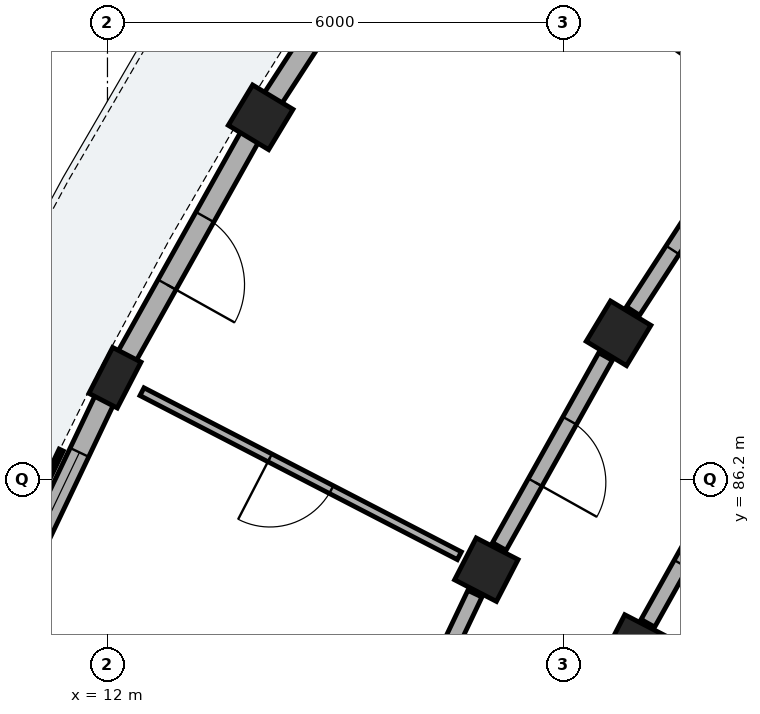
"""IFC4 building model, lengths in metres.
Left out: names, types, materials, properties, quantities, classifications, styles, units other than length and angle.
Written with IfcOpenShell. Run it as: python <this file> out.ifc"""

import sys

from ifc_helpers import new_model, si_unit, direction, frame, frame_2d, origin, origin_2d, place, context, subcontext, project, spatial, rectangle, extrude, element, fill, save


model = new_model("IFC4")
c1 = context("Model", 3, precision=1e-05, world=origin(), true_north=direction((0.0, 1.0)))
c2 = subcontext(c1, "Body", "Model", "MODEL_VIEW")
j1 = project(units=[si_unit("LENGTHUNIT", "METRE"), si_unit("PLANEANGLEUNIT", "RADIAN")], contexts=[c1])
p1 = place(None, origin())
s1 = spatial("IfcSite", under=j1, at=p1, CompositionType="ELEMENT")
p2 = place(p1, origin())
s2 = spatial("IfcBuilding", under=s1, at=p2, CompositionType="ELEMENT")
p3 = place(p2, frame((0.0, 0.0, 4.76)))
s3 = spatial("IfcBuildingStorey", under=s2, at=p3, CompositionType="ELEMENT", Elevation=4.76)
for number, where, z_axis, x_axis in (
    (1, (18.724, 88.128, 0.0), (0.0, 0.0, 1.0), (-0.856, 0.517, 0.0)),
    (2, (14.015, 90.969, 0.0), (0.0, 0.0, 1.0), (-0.856, 0.517, 0.0)),
    (3, (18.939, 84.008, 0.0), (0.0, 0.0, 1.0), (-0.888, 0.459, 0.0)),
    (4, (16.985, 85.018, 0.0), (0.0, 0.0, 1.0), (-0.888, 0.459, 0.0)),
):
    element("IfcColumn", number, at=place(p3, frame(where, z_axis=z_axis, x_axis=x_axis)), inside=s3, PredefinedType="COLUMN", context=c2, shape_type="SweptSolid", body=[
        extrude(rectangle(XDim=0.62, YDim=0.62, at=origin_2d()), origin(), (0.0, 0.0, 1.0), 3.825),
    ])
p4 = place(p3, frame((12.099, 87.543, 0.0), z_axis=(0.0, 0.0, 1.0), x_axis=(-0.888350277506, 0.459166401705, 0.0)))
e5 = element("IfcColumn", 5, at=p4, inside=s3, PredefinedType="PILASTER", context=c2, shape_type="SweptSolid", body=[
    extrude(rectangle(XDim=0.42, YDim=0.68, at=origin_2d()), origin(), (0.0, 0.0, 1.0), 3.825),
])
p5 = place(p3, frame((16.055, 94.111, 0.0), z_axis=(0.0, 0.0, 1.0), x_axis=(-0.544678802261, -0.838644741453, 0.0)))
e6 = element("IfcWall", 6, at=p5, inside=s3, PredefinedType="SOLIDWALL", context=c2, shape_type="SweptSolid", body=[
    extrude(rectangle(XDim=3.466, YDim=0.27, at=frame_2d((1.733, 0.0))), origin(), (0.0, 0.0, 1.0), 3.075),
])
p6 = place(p5, frame((1.058, 0.0, 0.55)))
e7 = element("IfcOpeningElement", 7, at=p6, cuts=e6, PredefinedType="OPENING", context=c2, shape_type="SweptSolid", body=[
    extrude(rectangle(XDim=1.35, YDim=1.65, at=frame_2d((0.675, 0.825))), frame((0.0, 0.145, 0.0), z_axis=(0.0, -1.0, 0.0), x_axis=(1.0, 0.0, 0.0)), (0.0, 0.0, 1.0), 0.29),
])
p7 = place(p3, frame((13.879, 90.725, 0.0), z_axis=(0.0, 0.0, 1.0), x_axis=(-0.488236527441, -0.872711345905, 0.0)))
e8 = element("IfcWall", 8, at=p7, inside=s3, PredefinedType="SOLIDWALL", context=c2, shape_type="SweptSolid", body=[
    extrude(rectangle(XDim=3.466, YDim=0.27, at=frame_2d((1.733, 0.0))), origin(), (0.0, 0.0, 1.0), 3.075),
])
p8 = place(p7, frame((1.223, 0.0, 0.0)))
e9 = element("IfcOpeningElement", 9, at=p8, cuts=e8, PredefinedType="OPENING", context=c2, shape_type="SweptSolid", body=[
    extrude(rectangle(XDim=1.02, YDim=2.14, at=frame_2d((0.51, 1.07))), frame((0.0, 0.145, 0.0), z_axis=(0.0, -1.0, 0.0), x_axis=(1.0, 0.0, 0.0)), (0.0, 0.0, 1.0), 0.29),
])
p9 = place(p3, frame((12.021, 87.381, 0.0), z_axis=(0.0, 0.0, 1.0), x_axis=(-0.4296300405, -0.903004999045, 0.0)))
e10 = element("IfcWall", 10, at=p9, inside=s3, PredefinedType="SOLIDWALL", context=c2, shape_type="SweptSolid", body=[
    extrude(rectangle(XDim=3.466, YDim=0.27, at=frame_2d((1.733, 0.0))), origin(), (0.0, 0.0, 1.0), 3.075),
])
p10 = place(p9, frame((0.908, 0.0, 0.55)))
e11 = element("IfcOpeningElement", 11, at=p10, cuts=e10, PredefinedType="OPENING", context=c2, shape_type="SweptSolid", body=[
    extrude(rectangle(XDim=1.65, YDim=1.8, at=frame_2d((0.825, 0.9))), frame((0.0, 0.145, 0.0), z_axis=(0.0, -1.0, 0.0), x_axis=(1.0, 0.0, 0.0)), (0.0, 0.0, 1.0), 0.29),
])
p11 = place(p3, frame((20.337, 91.345, 0.0), z_axis=(0.0, 0.0, 1.0), x_axis=(-0.820272617205, 0.571972755876, 0.0)))
e12 = element("IfcWall", 12, at=p11, inside=s3, PredefinedType="PLUMBINGWALL", context=c2, shape_type="SweptSolid", body=[
    extrude(rectangle(XDim=4.7, YDim=0.14, at=frame_2d((2.35, 0.0))), origin(), (0.0, 0.0, 1.0), 3.09),
])
p12 = place(p11, frame((1.92, 0.0, 0.0)))
e13 = element("IfcOpeningElement", 13, at=p12, cuts=e12, PredefinedType="OPENING", context=c2, shape_type="SweptSolid", body=[
    extrude(rectangle(XDim=0.86, YDim=2.06, at=frame_2d((0.43, 1.03))), frame((0.0, 0.08, 0.0), z_axis=(0.0, -1.0, 0.0), x_axis=(1.0, 0.0, 0.0)), (0.0, 0.0, 1.0), 0.16),
])
p13 = place(p3, frame((20.474, 90.822, 0.0), z_axis=(0.0, 0.0, 1.0), x_axis=(-0.544643612649, -0.838667595178, 0.0)))
e14 = element("IfcWall", 14, at=p13, inside=s3, PredefinedType="PARTITIONING", context=c2, shape_type="SweptSolid", body=[
    extrude(rectangle(XDim=2.863, YDim=0.205, at=frame_2d((1.432, 0.0))), origin(), (0.0, 0.0, 1.0), 3.09),
])
p14 = place(p13, frame((0.957, 0.0, 0.0)))
e15 = element("IfcOpeningElement", 15, at=p14, cuts=e14, PredefinedType="OPENING", context=c2, shape_type="SweptSolid", body=[
    extrude(rectangle(XDim=0.95, YDim=2.13, at=frame_2d((0.475, 1.065))), frame((0.0, 0.113, 0.0), z_axis=(0.0, -1.0, 0.0), x_axis=(1.0, 0.0, 0.0)), (0.0, 0.0, 1.0), 0.225),
])
p15 = place(p3, frame((18.553, 87.822, 0.0), z_axis=(0.0, 0.0, 1.0), x_axis=(-0.488211211273, -0.872725508501, 0.0)))
e16 = element("IfcWall", 16, at=p15, inside=s3, PredefinedType="PARTITIONING", context=c2, shape_type="SweptSolid", body=[
    extrude(rectangle(XDim=2.863, YDim=0.205, at=frame_2d((1.431, 0.0))), origin(), (0.0, 0.0, 1.0), 3.09),
])
p16 = place(p15, frame((0.967, 0.0, 0.0)))
e17 = element("IfcOpeningElement", 17, at=p16, cuts=e16, PredefinedType="OPENING", context=c2, shape_type="SweptSolid", body=[
    extrude(rectangle(XDim=0.93, YDim=2.12, at=frame_2d((0.465, 1.06))), frame((0.0, 0.113, 0.0), z_axis=(0.0, -1.0, 0.0), x_axis=(1.0, 0.0, 0.0)), (0.0, 0.0, 1.0), 0.225),
])
p17 = place(p3, frame((20.437, 86.685, 0.0), z_axis=(0.0, 0.0, 1.0), x_axis=(-0.48819576874, -0.872734147025, 0.0)))
e18 = element("IfcWall", 18, at=p17, inside=s3, PredefinedType="PARTITIONING", context=c2, shape_type="SweptSolid", body=[
    extrude(rectangle(XDim=2.718, YDim=0.205, at=frame_2d((1.359, 0.0))), origin(), (0.0, 0.0, 1.0), 3.09),
])
p18 = place(p17, frame((0.894, 0.0, 0.0)))
e19 = element("IfcOpeningElement", 19, at=p18, cuts=e18, PredefinedType="OPENING", context=c2, shape_type="SweptSolid", body=[
    extrude(rectangle(XDim=0.93, YDim=2.12, at=frame_2d((0.465, 1.06))), frame((0.0, 0.113, 0.0), z_axis=(0.0, -1.0, 0.0), x_axis=(1.0, 0.0, 0.0)), (0.0, 0.0, 1.0), 0.225),
])
p19 = place(p3, frame((16.629, 85.202, 0.0), z_axis=(0.0, 0.0, 1.0), x_axis=(-0.88836305433, 0.459141681512, 0.0)))
e20 = element("IfcWall", 20, at=p19, inside=s3, PredefinedType="PARTITIONING", context=c2, shape_type="SweptSolid", body=[
    extrude(rectangle(XDim=4.7, YDim=0.115, at=frame_2d((2.35, 0.0))), origin(), (0.0, 0.0, 1.0), 3.09),
])
p20 = place(p19, frame((1.895, 0.0, 0.0)))
e21 = element("IfcOpeningElement", 21, at=p20, cuts=e20, PredefinedType="OPENING", context=c2, shape_type="SweptSolid", body=[
    extrude(rectangle(XDim=0.91, YDim=2.1, at=frame_2d((0.455, 1.05))), frame((0.0, 0.067, 0.0), z_axis=(0.0, -1.0, 0.0), x_axis=(1.0, 0.0, 0.0)), (0.0, 0.0, 1.0), 0.135),
])
p21 = place(p3, frame((16.834, 84.702, 0.0), z_axis=(0.0, 0.0, 1.0), x_axis=(-0.429595933416, -0.90302122566, 0.0)))
e22 = element("IfcWall", 22, at=p21, inside=s3, PredefinedType="PARTITIONING", context=c2, shape_type="SweptSolid", body=[
    extrude(rectangle(XDim=2.863, YDim=0.205, at=frame_2d((1.432, 0.0))), origin(), (0.0, 0.0, 1.0), 3.09),
])
p22 = place(p21, frame((0.937, 0.0, 0.0)))
e23 = element("IfcOpeningElement", 23, at=p22, cuts=e22, PredefinedType="OPENING", context=c2, shape_type="SweptSolid", body=[
    extrude(rectangle(XDim=0.99, YDim=2.16, at=frame_2d((0.495, 1.08))), frame((0.0, 0.113, 0.0), z_axis=(0.0, -1.0, 0.0), x_axis=(1.0, 0.0, 0.0)), (0.0, 0.0, 1.0), 0.225),
])
p23 = place(p8, origin())
e24 = element("IfcDoor", 24, at=p23, inside=s3, OperationType="SINGLE_SWING_RIGHT", PredefinedType="DOOR", context=c2, shape_type="SweptSolid", body=[
    extrude(rectangle(XDim=1.02, YDim=2.14, at=frame_2d((0.51, 1.07))), frame((0.0, 0.025, 0.0), z_axis=(0.0, -1.0, 0.0), x_axis=(1.0, 0.0, 0.0)), (0.0, 0.0, 1.0), 0.05),
])
fill(e9, e24)
p24 = place(p10, origin())
e25 = element("IfcWindow", 25, at=p24, inside=s3, PartitioningType="SINGLE_PANEL", PredefinedType="WINDOW", context=c2, shape_type="SweptSolid", body=[
    extrude(rectangle(XDim=1.65, YDim=1.8, at=frame_2d((0.825, 0.9))), frame((0.0, 0.03, 0.0), z_axis=(0.0, -1.0, 0.0), x_axis=(1.0, 0.0, 0.0)), (0.0, 0.0, 1.0), 0.06),
])
fill(e11, e25)
p25 = place(p14, origin())
e26 = element("IfcDoor", 26, at=p25, inside=s3, OperationType="SINGLE_SWING_LEFT", PredefinedType="DOOR", context=c2, shape_type="SweptSolid", body=[
    extrude(rectangle(XDim=0.95, YDim=2.13, at=frame_2d((0.475, 1.065))), frame((0.0, 0.025, 0.0), z_axis=(0.0, -1.0, 0.0), x_axis=(1.0, 0.0, 0.0)), (0.0, 0.0, 1.0), 0.05),
])
fill(e15, e26)
p26 = place(p16, origin())
e27 = element("IfcDoor", 27, at=p26, inside=s3, OperationType="SINGLE_SWING_RIGHT", PredefinedType="DOOR", context=c2, shape_type="SweptSolid", body=[
    extrude(rectangle(XDim=0.93, YDim=2.12, at=frame_2d((0.465, 1.06))), frame((0.0, 0.025, 0.0), z_axis=(0.0, -1.0, 0.0), x_axis=(1.0, 0.0, 0.0)), (0.0, 0.0, 1.0), 0.05),
])
fill(e17, e27)
p27 = place(p18, origin())
e28 = element("IfcDoor", 28, at=p27, inside=s3, OperationType="SINGLE_SWING_LEFT", PredefinedType="DOOR", context=c2, shape_type="SweptSolid", body=[
    extrude(rectangle(XDim=0.93, YDim=2.12, at=frame_2d((0.465, 1.06))), frame((0.0, 0.025, 0.0), z_axis=(0.0, -1.0, 0.0), x_axis=(1.0, 0.0, 0.0)), (0.0, 0.0, 1.0), 0.05),
])
fill(e19, e28)
p28 = place(p20, origin())
e29 = element("IfcDoor", 29, at=p28, inside=s3, OperationType="SINGLE_SWING_RIGHT", PredefinedType="DOOR", context=c2, shape_type="SweptSolid", body=[
    extrude(rectangle(XDim=0.91, YDim=2.1, at=frame_2d((0.455, 1.05))), frame((0.0, 0.025, 0.0), z_axis=(0.0, -1.0, 0.0), x_axis=(1.0, 0.0, 0.0)), (0.0, 0.0, 1.0), 0.05),
])
fill(e21, e29)
save(model, sys.argv[1])
